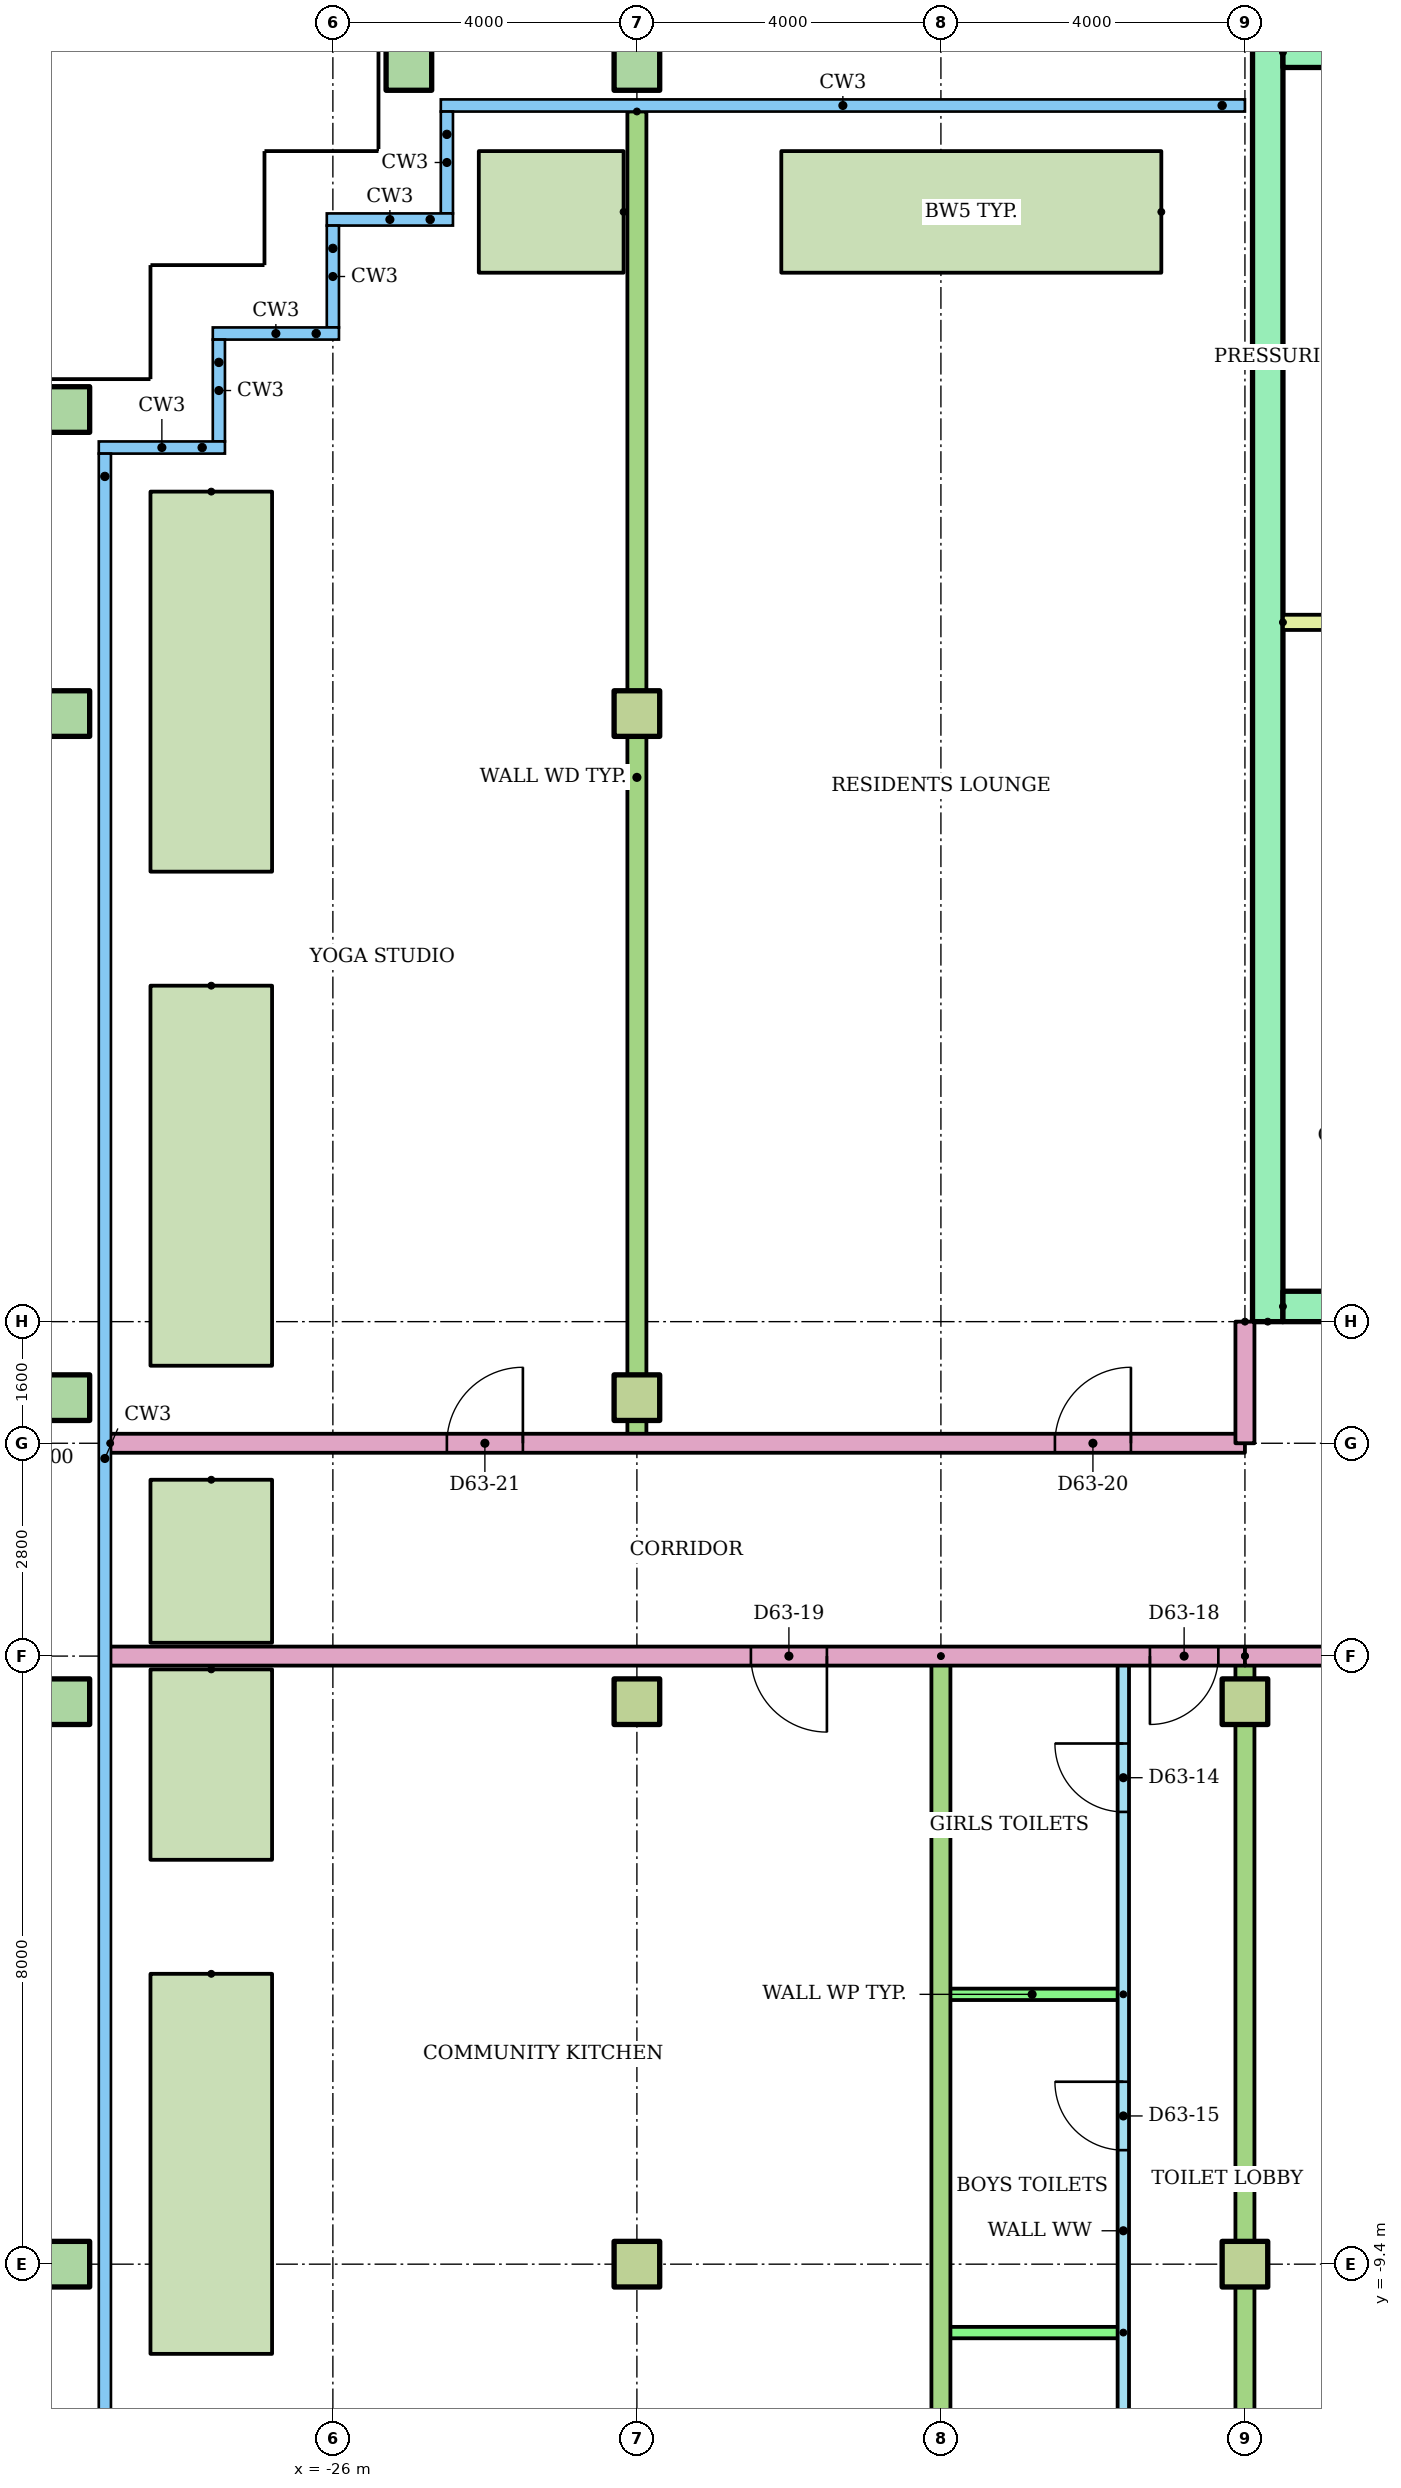
"""IFC4 building model, lengths in metres.
Left out: names, types, materials, properties, quantities, classifications, styles, units other than length and angle.
Written with IfcOpenShell. Run it as: python <this file> out.ifc"""

import sys

from ifc_helpers import new_model, si_unit, direction, frame, frame_2d, origin, origin_2d, place, context, subcontext, project, spatial, rectangle, hollow_rectangle, extrude, element, fill, save


model = new_model("IFC4")
c1 = context("Model", 3, precision=1e-05, world=origin(), true_north=direction((0.0, 1.0)))
c2 = subcontext(c1, "Body", "Model", "MODEL_VIEW")
j1 = project(units=[si_unit("LENGTHUNIT", "METRE"), si_unit("PLANEANGLEUNIT", "RADIAN")], contexts=[c1])
p1 = place(None, origin())
s1 = spatial("IfcSite", under=j1, at=p1, CompositionType="ELEMENT")
p2 = place(p1, origin())
s2 = spatial("IfcBuilding", under=s1, at=p2, CompositionType="ELEMENT")
p3 = place(p2, frame((0.0, 0.0, 239.6)))
s3 = spatial("IfcBuildingStorey", under=s2, at=p3, CompositionType="ELEMENT", Elevation=239.6)
p4 = place(p3, frame((-29.5, -9.4, 0.0)))
e1 = element("IfcColumn", 1, at=p4, inside=s3, PredefinedType="COLUMN", context=c2, shape_type="SweptSolid", body=[
    extrude(hollow_rectangle(XDim=0.6, YDim=0.6, WallThickness=0.03, at=origin_2d()), origin(), (0.0, 0.0, 1.0), 9.25),
])
for number, where in (
    (2, (-22.0, -9.4, 0.0)),
    (3, (-14.0, -9.4, 0.0)),
):
    element("IfcColumn", number, at=place(p3, frame(where)), inside=s3, PredefinedType="COLUMN", context=c2, shape_type="SweptSolid", body=[
        extrude(rectangle(XDim=0.6, YDim=0.6, at=origin_2d()), origin(), (0.0, 0.0, 1.0), 8.8),
    ])
p5 = place(p3, frame((-29.5, -2.0, 0.0)))
e4 = element("IfcColumn", 4, at=p5, inside=s3, PredefinedType="COLUMN", context=c2, shape_type="SweptSolid", body=[
    extrude(hollow_rectangle(XDim=0.6, YDim=0.6, WallThickness=0.03, at=origin_2d()), origin(), (0.0, 0.0, 1.0), 9.25),
])
for number, where in (
    (5, (-22.0, -2.0, 0.0)),
    (6, (-14.0, -2.0, 0.0)),
):
    element("IfcColumn", number, at=place(p3, frame(where)), inside=s3, PredefinedType="COLUMN", context=c2, shape_type="SweptSolid", body=[
        extrude(rectangle(XDim=0.6, YDim=0.6, at=origin_2d()), origin(), (0.0, 0.0, 1.0), 8.8),
    ])
p6 = place(p3, frame((-29.5, 2.0, 0.0)))
e7 = element("IfcColumn", 7, at=p6, inside=s3, PredefinedType="COLUMN", context=c2, shape_type="SweptSolid", body=[
    extrude(hollow_rectangle(XDim=0.6, YDim=0.6, WallThickness=0.03, at=origin_2d()), origin(), (0.0, 0.0, 1.0), 9.25),
])
p7 = place(p3, frame((-22.0, 2.0, 0.0)))
e8 = element("IfcColumn", 8, at=p7, inside=s3, PredefinedType="COLUMN", context=c2, shape_type="SweptSolid", body=[
    extrude(rectangle(XDim=0.6, YDim=0.6, at=origin_2d()), origin(), (0.0, 0.0, 1.0), 8.8),
])
p8 = place(p3, frame((-29.5, 11.0, 0.0)))
e9 = element("IfcColumn", 9, at=p8, inside=s3, PredefinedType="COLUMN", context=c2, shape_type="SweptSolid", body=[
    extrude(hollow_rectangle(XDim=0.6, YDim=0.6, WallThickness=0.03, at=origin_2d()), origin(), (0.0, 0.0, 1.0), 9.25),
])
p9 = place(p3, frame((-22.0, 11.0, 0.0)))
e10 = element("IfcColumn", 10, at=p9, inside=s3, PredefinedType="COLUMN", context=c2, shape_type="SweptSolid", body=[
    extrude(rectangle(XDim=0.6, YDim=0.6, at=origin_2d()), origin(), (0.0, 0.0, 1.0), 8.8),
])
for number, where in (
    (11, (-29.5, 15.0, 0.0)),
    (12, (-25.0, 19.5, 0.0)),
    (13, (-22.0, 19.5, 0.0)),
):
    element("IfcColumn", number, at=place(p3, frame(where)), inside=s3, PredefinedType="COLUMN", context=c2, shape_type="SweptSolid", body=[
        extrude(hollow_rectangle(XDim=0.6, YDim=0.6, WallThickness=0.03, at=origin_2d()), origin(), (0.0, 0.0, 1.0), 9.25),
    ])
for number, where, z_axis, x_axis in (
    (14, (-15.1, 17.6, 0.0), (0.0, 0.0, 1.0), (-1.0, 0.0, 0.0)),
    (15, (-27.6, 13.92, 0.0), (0.0, 0.0, 1.0), (0.0, -1.0, 0.0)),
    (16, (-27.6, 7.42, 0.0), (0.0, 0.0, 1.0), (0.0, -1.0, 0.0)),
    (17, (-27.6, -5.58, 0.0), (0.0, 0.0, 1.0), (0.0, -1.0, 0.0)),
):
    element("IfcWall", number, at=place(p3, frame(where, z_axis=z_axis, x_axis=x_axis)), inside=s3, PredefinedType="STANDARD", context=c2, shape_type="SweptSolid", body=[
        extrude(rectangle(XDim=5.0, YDim=1.6, at=frame_2d((2.5, 0.0))), origin(), (0.0, 0.0, 1.0), 0.8),
    ])
p10 = place(p3, frame((-13.7, 3.0, 0.0), z_axis=(0.0, 0.0, 1.0), x_axis=(0.0, 1.0, 0.0)))
e18 = element("IfcWall", 18, at=p10, inside=s3, PredefinedType="SHEAR", context=c2, shape_type="SweptSolid", body=[
    extrude(rectangle(XDim=17.0, YDim=0.4, at=frame_2d((8.5, 0.0))), origin(), (0.0, 0.0, 1.0), 8.8),
])
p11 = place(p3, frame((-13.5, 19.7, 0.0)))
e19 = element("IfcWall", 19, at=p11, inside=s3, PredefinedType="SHEAR", context=c2, shape_type="SweptSolid", body=[
    extrude(rectangle(XDim=27.0, YDim=0.4, at=frame_2d((13.5, 0.0))), origin(), (0.0, 0.0, 1.0), 8.8),
])
p12 = place(p3, frame((-13.5, 3.2, 0.0)))
e20 = element("IfcWall", 20, at=p12, inside=s3, PredefinedType="SHEAR", context=c2, shape_type="SweptSolid", body=[
    extrude(rectangle(XDim=27.0, YDim=0.4, at=frame_2d((13.5, 0.0))), origin(), (0.0, 0.0, 1.0), 8.8),
])
p13 = place(p12, frame((22.083, 0.0, 0.0)))
e21 = element("IfcOpeningElement", 21, at=p13, cuts=e20, PredefinedType="OPENING", context=c2, shape_type="SweptSolid", body=[
    extrude(rectangle(XDim=1.1, YDim=2.1, at=frame_2d((0.55, 1.05))), frame((0.0, 0.21, 0.0), z_axis=(0.0, -1.0, 0.0), x_axis=(1.0, 0.0, 0.0)), (0.0, 0.0, 1.0), 0.42),
])
p14 = place(p12, frame((25.128, 0.0, 0.0)))
e22 = element("IfcOpeningElement", 22, at=p14, cuts=e20, PredefinedType="OPENING", context=c2, shape_type="SweptSolid", body=[
    extrude(rectangle(XDim=1.1, YDim=2.1, at=frame_2d((0.55, 1.05))), frame((0.0, 0.21, 0.0), z_axis=(0.0, -1.0, 0.0), x_axis=(1.0, 0.0, 0.0)), (0.0, 0.0, 1.0), 0.42),
])
p15 = place(p12, frame((12.6, 0.0, 0.0)))
e23 = element("IfcOpeningElement", 23, at=p15, cuts=e20, PredefinedType="OPENING", context=c2, shape_type="SweptSolid", body=[
    extrude(rectangle(XDim=1.8, YDim=2.1, at=frame_2d((0.9, 1.05))), frame((0.0, 0.21, 0.0), z_axis=(0.0, -1.0, 0.0), x_axis=(1.0, 0.0, 0.0)), (0.0, 0.0, 1.0), 0.42),
])
p16 = place(p3, frame((-13.5, 12.2, 0.0)))
e24 = element("IfcWall", 24, at=p16, inside=s3, PredefinedType="PARTITIONING", context=c2, shape_type="SweptSolid", body=[
    extrude(rectangle(XDim=3.9, YDim=0.2, at=frame_2d((1.95, 0.0))), origin(), (0.0, 0.0, 1.0), 8.8),
])
p17 = place(p3, frame((-14.0, -1.4, 0.0), z_axis=(0.0, 0.0, 1.0), x_axis=(-1.0, 0.0, 0.0)))
e25 = element("IfcWall", 25, at=p17, inside=s3, PredefinedType="PARTITIONING", context=c2, shape_type="SweptSolid", body=[
    extrude(rectangle(XDim=14.93, YDim=0.25, at=frame_2d((7.465, 0.0))), origin(), (0.0, 0.0, 1.0), 8.8),
])
p18 = place(p17, frame((0.35, 0.0, 0.0)))
e26 = element("IfcOpeningElement", 26, at=p18, cuts=e25, PredefinedType="OPENING", context=c2, shape_type="SweptSolid", body=[
    extrude(rectangle(XDim=0.9, YDim=2.1, at=frame_2d((0.45, 1.05))), frame((0.0, 0.135, 0.0), z_axis=(0.0, -1.0, 0.0), x_axis=(1.0, 0.0, 0.0)), (0.0, 0.0, 1.0), 0.27),
])
p19 = place(p17, frame((5.5, 0.0, 0.0)))
e27 = element("IfcOpeningElement", 27, at=p19, cuts=e25, PredefinedType="OPENING", context=c2, shape_type="SweptSolid", body=[
    extrude(rectangle(XDim=1.0, YDim=2.1, at=frame_2d((0.5, 1.05))), frame((0.0, 0.135, 0.0), z_axis=(0.0, -1.0, 0.0), x_axis=(1.0, 0.0, 0.0)), (0.0, 0.0, 1.0), 0.27),
])
p20 = place(p3, frame((-15.6, -16.521, 0.0), z_axis=(0.0, 0.0, 1.0), x_axis=(0.0, 1.0, 0.0)))
e28 = element("IfcWall", 28, at=p20, inside=s3, PredefinedType="PARTITIONING", context=c2, shape_type="SweptSolid", body=[
    extrude(rectangle(XDim=15.121, YDim=0.15, at=frame_2d((7.561, 0.0))), origin(), (0.0, 0.0, 1.0), 8.8),
])
p21 = place(p20, frame((13.071, 0.0, 0.0)))
e29 = element("IfcOpeningElement", 29, at=p21, cuts=e28, PredefinedType="OPENING", context=c2, shape_type="SweptSolid", body=[
    extrude(rectangle(XDim=0.9, YDim=2.1, at=frame_2d((0.45, 1.05))), frame((0.0, 0.085, 0.0), z_axis=(0.0, -1.0, 0.0), x_axis=(1.0, 0.0, 0.0)), (0.0, 0.0, 1.0), 0.17),
])
p22 = place(p20, frame((8.621, 0.0, 0.0)))
e30 = element("IfcOpeningElement", 30, at=p22, cuts=e28, PredefinedType="OPENING", context=c2, shape_type="SweptSolid", body=[
    extrude(rectangle(XDim=0.9, YDim=2.1, at=frame_2d((0.45, 1.05))), frame((0.0, 0.085, 0.0), z_axis=(0.0, -1.0, 0.0), x_axis=(1.0, 0.0, 0.0)), (0.0, 0.0, 1.0), 0.17),
])
p23 = place(p20, frame((4.121, 0.0, 0.0)))
e31 = element("IfcOpeningElement", 31, at=p23, cuts=e28, PredefinedType="OPENING", context=c2, shape_type="SweptSolid", body=[
    extrude(rectangle(XDim=1.0, YDim=2.1, at=frame_2d((0.5, 1.05))), frame((0.0, 0.085, 0.0), z_axis=(0.0, -1.0, 0.0), x_axis=(1.0, 0.0, 0.0)), (0.0, 0.0, 1.0), 0.17),
])
p24 = place(p20, frame((0.571, 0.0, 0.0)))
e32 = element("IfcOpeningElement", 32, at=p24, cuts=e28, PredefinedType="OPENING", context=c2, shape_type="SweptSolid", body=[
    extrude(rectangle(XDim=0.9, YDim=2.1, at=frame_2d((0.45, 1.05))), frame((0.0, 0.085, 0.0), z_axis=(0.0, -1.0, 0.0), x_axis=(1.0, 0.0, 0.0)), (0.0, 0.0, 1.0), 0.17),
])
for number, where, z_axis, x_axis in (
    (33, (-15.6, -5.85, 0.0), (0.0, 0.0, 1.0), (-1.0, 0.0, 0.0)),
    (34, (-15.6, -10.3, 0.0), (0.0, 0.0, 1.0), (-1.0, 0.0, 0.0)),
):
    element("IfcWall", number, at=place(p3, frame(where, z_axis=z_axis, x_axis=x_axis)), inside=s3, PredefinedType="PARTITIONING", context=c2, shape_type="SweptSolid", body=[
        extrude(rectangle(XDim=2.4, YDim=0.15, at=frame_2d((1.2, 0.0))), origin(), (0.0, 0.0, 1.0), 8.8),
    ])
for number, where, z_axis, x_axis in (
    (35, (-18.0, -1.4, 0.0), (0.0, 0.0, 1.0), (0.0, -1.0, 0.0)),
    (36, (-14.0, -1.4, 0.0), (0.0, 0.0, 1.0), (0.0, -1.0, 0.0)),
):
    element("IfcWall", number, at=place(p3, frame(where, z_axis=z_axis, x_axis=x_axis)), inside=s3, PredefinedType="PARTITIONING", context=c2, shape_type="SweptSolid", body=[
        extrude(rectangle(XDim=15.121, YDim=0.25, at=frame_2d((7.561, 0.0))), origin(), (0.0, 0.0, 1.0), 8.8),
    ])
p25 = place(p3, frame((-28.93, 1.4, 0.0)))
e37 = element("IfcWall", 37, at=p25, inside=s3, PredefinedType="PARTITIONING", context=c2, shape_type="SweptSolid", body=[
    extrude(rectangle(XDim=14.93, YDim=0.25, at=frame_2d((7.465, 0.0))), origin(), (0.0, 0.0, 1.0), 8.8),
])
p26 = place(p25, frame((12.43, 0.0, 0.0)))
e38 = element("IfcOpeningElement", 38, at=p26, cuts=e37, PredefinedType="OPENING", context=c2, shape_type="SweptSolid", body=[
    extrude(rectangle(XDim=1.0, YDim=2.1, at=frame_2d((0.5, 1.05))), frame((0.0, 0.135, 0.0), z_axis=(0.0, -1.0, 0.0), x_axis=(1.0, 0.0, 0.0)), (0.0, 0.0, 1.0), 0.27),
])
p27 = place(p25, frame((4.43, 0.0, 0.0)))
e39 = element("IfcOpeningElement", 39, at=p27, cuts=e37, PredefinedType="OPENING", context=c2, shape_type="SweptSolid", body=[
    extrude(rectangle(XDim=1.0, YDim=2.1, at=frame_2d((0.5, 1.05))), frame((0.0, 0.135, 0.0), z_axis=(0.0, -1.0, 0.0), x_axis=(1.0, 0.0, 0.0)), (0.0, 0.0, 1.0), 0.27),
])
p28 = place(p3, frame((-22.0, 18.921, 0.0), z_axis=(0.0, 0.0, 1.0), x_axis=(0.0, -1.0, 0.0)))
e40 = element("IfcWall", 40, at=p28, inside=s3, PredefinedType="PARTITIONING", context=c2, shape_type="SweptSolid", body=[
    extrude(rectangle(XDim=17.521, YDim=0.25, at=frame_2d((8.76, 0.0))), origin(), (0.0, 0.0, 1.0), 8.8),
])
p29 = place(p3, frame((14.0, -1.4, 0.0), z_axis=(0.0, 0.0, 1.0), x_axis=(-1.0, 0.0, 0.0)))
e41 = element("IfcWall", 41, at=p29, inside=s3, PredefinedType="PARTITIONING", context=c2, shape_type="SweptSolid", body=[
    extrude(rectangle(XDim=28.0, YDim=0.25, at=frame_2d((14.0, 0.0))), origin(), (0.0, 0.0, 1.0), 8.8),
])
p30 = place(p29, frame((25.5, 0.0, 0.0)))
e42 = element("IfcOpeningElement", 42, at=p30, cuts=e41, PredefinedType="OPENING", context=c2, shape_type="SweptSolid", body=[
    extrude(rectangle(XDim=1.0, YDim=2.1, at=frame_2d((0.5, 1.05))), frame((0.0, 0.135, 0.0), z_axis=(0.0, -1.0, 0.0), x_axis=(1.0, 0.0, 0.0)), (0.0, 0.0, 1.0), 0.27),
])
p31 = place(p29, frame((17.5, 0.0, 0.0)))
e43 = element("IfcOpeningElement", 43, at=p31, cuts=e41, PredefinedType="OPENING", context=c2, shape_type="SweptSolid", body=[
    extrude(rectangle(XDim=1.0, YDim=2.1, at=frame_2d((0.5, 1.05))), frame((0.0, 0.135, 0.0), z_axis=(0.0, -1.0, 0.0), x_axis=(1.0, 0.0, 0.0)), (0.0, 0.0, 1.0), 0.27),
])
p32 = place(p29, frame((1.5, 0.0, 0.0)))
e44 = element("IfcOpeningElement", 44, at=p32, cuts=e41, PredefinedType="OPENING", context=c2, shape_type="SweptSolid", body=[
    extrude(rectangle(XDim=1.0, YDim=2.1, at=frame_2d((0.5, 1.05))), frame((0.0, 0.135, 0.0), z_axis=(0.0, -1.0, 0.0), x_axis=(1.0, 0.0, 0.0)), (0.0, 0.0, 1.0), 0.27),
])
p33 = place(p3, frame((-14.0, 3.0, 0.0), z_axis=(0.0, 0.0, 1.0), x_axis=(0.0, -1.0, 0.0)))
e45 = element("IfcWall", 45, at=p33, inside=s3, PredefinedType="PARTITIONING", context=c2, shape_type="SweptSolid", body=[
    extrude(rectangle(XDim=1.6, YDim=0.25, at=frame_2d((0.8, 0.0))), origin(), (0.0, 0.0, 1.0), 8.8),
])
p34 = place(p3, frame((-22.175, 17.6, 0.0), z_axis=(0.0, 0.0, 1.0), x_axis=(-1.0, 0.0, 0.0)))
e46 = element("IfcWall", 46, at=p34, inside=s3, PredefinedType="STANDARD", context=c2, shape_type="SweptSolid", body=[
    extrude(rectangle(XDim=1.905, YDim=1.6, at=frame_2d((0.953, 0.0))), origin(), (0.0, 0.0, 1.0), 0.8),
])
p35 = place(p3, frame((-27.6, 0.92, 0.0), z_axis=(0.0, 0.0, 1.0), x_axis=(0.0, -1.0, 0.0)))
e47 = element("IfcWall", 47, at=p35, inside=s3, PredefinedType="STANDARD", context=c2, shape_type="SweptSolid", body=[
    extrude(rectangle(XDim=2.145, YDim=1.6, at=frame_2d((1.073, 0.0))), origin(), (0.0, 0.0, 1.0), 0.8),
])
p36 = place(p3, frame((-27.6, -1.575, 0.0), z_axis=(0.0, 0.0, 1.0), x_axis=(0.0, -1.0, 0.0)))
e48 = element("IfcWall", 48, at=p36, inside=s3, PredefinedType="STANDARD", context=c2, shape_type="SweptSolid", body=[
    extrude(rectangle(XDim=2.505, YDim=1.6, at=frame_2d((1.252, 0.0))), origin(), (0.0, 0.0, 1.0), 0.8),
])
p37 = place(p21, origin())
e49 = element("IfcDoor", 49, at=p37, inside=s3, OperationType="SINGLE_SWING_RIGHT", PredefinedType="DOOR", context=c2, shape_type="SweptSolid", body=[
    extrude(rectangle(XDim=0.9, YDim=2.1, at=frame_2d((0.45, 1.05))), frame((0.0, 0.025, 0.0), z_axis=(0.0, -1.0, 0.0), x_axis=(1.0, 0.0, 0.0)), (0.0, 0.0, 1.0), 0.05),
])
fill(e29, e49)
p38 = place(p22, origin())
e50 = element("IfcDoor", 50, at=p38, inside=s3, OperationType="SINGLE_SWING_RIGHT", PredefinedType="DOOR", context=c2, shape_type="SweptSolid", body=[
    extrude(rectangle(XDim=0.9, YDim=2.1, at=frame_2d((0.45, 1.05))), frame((0.0, 0.025, 0.0), z_axis=(0.0, -1.0, 0.0), x_axis=(1.0, 0.0, 0.0)), (0.0, 0.0, 1.0), 0.05),
])
fill(e30, e50)
p39 = place(p18, origin())
e51 = element("IfcDoor", 51, at=p39, inside=s3, OperationType="SINGLE_SWING_RIGHT", PredefinedType="DOOR", context=c2, shape_type="SweptSolid", body=[
    extrude(rectangle(XDim=0.9, YDim=2.1, at=frame_2d((0.45, 1.05))), frame((0.0, 0.025, 0.0), z_axis=(0.0, -1.0, 0.0), x_axis=(1.0, 0.0, 0.0)), (0.0, 0.0, 1.0), 0.05),
])
fill(e26, e51)
p40 = place(p19, origin())
e52 = element("IfcDoor", 52, at=p40, inside=s3, OperationType="SINGLE_SWING_LEFT", PredefinedType="DOOR", context=c2, shape_type="SweptSolid", body=[
    extrude(rectangle(XDim=1.0, YDim=2.1, at=frame_2d((0.5, 1.05))), frame((0.0, 0.025, 0.0), z_axis=(0.0, -1.0, 0.0), x_axis=(1.0, 0.0, 0.0)), (0.0, 0.0, 1.0), 0.05),
])
fill(e27, e52)
p41 = place(p26, origin())
e53 = element("IfcDoor", 53, at=p41, inside=s3, OperationType="SINGLE_SWING_RIGHT", PredefinedType="DOOR", context=c2, shape_type="SweptSolid", body=[
    extrude(rectangle(XDim=1.0, YDim=2.1, at=frame_2d((0.5, 1.05))), frame((0.0, 0.025, 0.0), z_axis=(0.0, -1.0, 0.0), x_axis=(1.0, 0.0, 0.0)), (0.0, 0.0, 1.0), 0.05),
])
fill(e38, e53)
p42 = place(p27, origin())
e54 = element("IfcDoor", 54, at=p42, inside=s3, OperationType="SINGLE_SWING_RIGHT", PredefinedType="DOOR", context=c2, shape_type="SweptSolid", body=[
    extrude(rectangle(XDim=1.0, YDim=2.1, at=frame_2d((0.5, 1.05))), frame((0.0, 0.025, 0.0), z_axis=(0.0, -1.0, 0.0), x_axis=(1.0, 0.0, 0.0)), (0.0, 0.0, 1.0), 0.05),
])
fill(e39, e54)
save(model, sys.argv[1])
